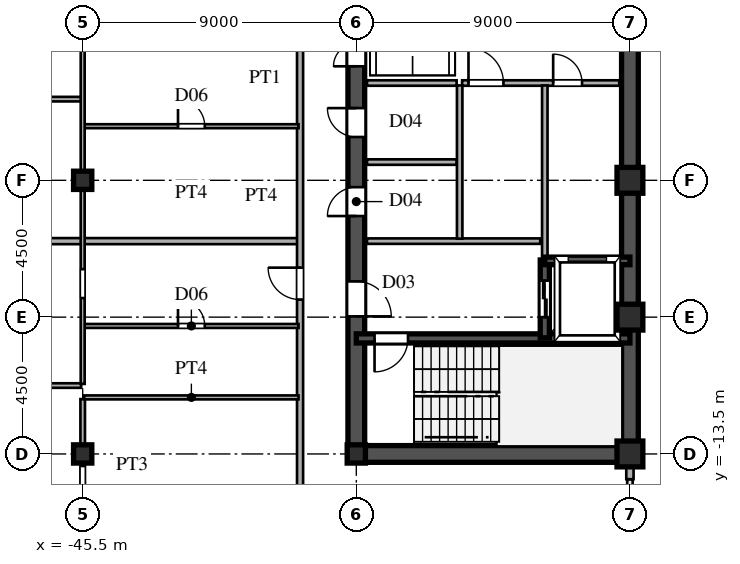
"""IFC4 building model, lengths in metres.
Left out: names, types, materials, properties, quantities, classifications, styles, units other than length and angle.
Written with IfcOpenShell. Run it as: python <this file> out.ifc"""

import sys

from ifc_helpers import new_model, si_unit, direction, frame, frame_2d, origin, origin_2d, place, context, subcontext, project, spatial, rectangle, hollow_rectangle, i_section, extrude, source, transform, mapped, element, fill, save


model = new_model("IFC4")
c1 = context("Model", 3, precision=1e-05, world=origin(), true_north=direction((0.0, 1.0)))
c2 = subcontext(c1, "Body", "Model", "MODEL_VIEW")
j1 = project(units=[si_unit("LENGTHUNIT", "METRE"), si_unit("PLANEANGLEUNIT", "RADIAN")], contexts=[c1])
p1 = place(None, origin())
s1 = spatial("IfcSite", under=j1, at=p1, CompositionType="ELEMENT")
p2 = place(p1, origin())
s2 = spatial("IfcBuilding", under=s1, at=p2, CompositionType="ELEMENT")
p3 = place(p2, frame((0.0, 0.0, 181.5)))
s3 = spatial("IfcBuildingStorey", under=s2, at=p3, CompositionType="ELEMENT", Elevation=181.5)
m1 = source(origin(), c2, "Body", "SweptSolid", [
    extrude(hollow_rectangle(XDim=0.85, YDim=0.85, WallThickness=0.036, at=origin_2d()), origin(), (0.0, 0.0, 1.0), 3.6),
])
for number, where, z_axis, x_axis in (
    (1, (-27.5, -13.5, 0.0), (0.0, 0.0, 1.0), (1.0, 0.0, 0.0)),
    (2, (-27.5, -9.0, 0.0), (0.0, 0.0, 1.0), (1.0, 0.0, 0.0)),
    (3, (-27.5, -4.5, 0.0), (0.0, 0.0, 1.0), (1.0, 0.0, 0.0)),
):
    element("IfcColumn", number, at=place(p3, frame(where, z_axis=z_axis, x_axis=x_axis)), inside=s3, PredefinedType="COLUMN", context=c2, shape_type="MappedRepresentation", body=[
        mapped(m1, transform((0.0, 0.0, 0.0), scale=1.0)),
    ])
m2 = source(origin(), c2, "Body", "SweptSolid", [
    extrude(i_section(OverallWidth=0.6, OverallDepth=0.6, WebThickness=0.025, FlangeThickness=0.04, at=origin_2d()), origin(), (0.0, 0.0, 1.0), 3.6),
])
for number, where, z_axis, x_axis in (
    (4, (-36.5, -13.5, 0.0), (0.0, 0.0, 1.0), (1.0, 0.0, 0.0)),
    (5, (-45.5, -13.5, 0.0), (0.0, 0.0, 1.0), (1.0, 0.0, 0.0)),
    (6, (-45.5, -4.5, 0.0), (0.0, 0.0, 1.0), (1.0, 0.0, 0.0)),
):
    element("IfcColumn", number, at=place(p3, frame(where, z_axis=z_axis, x_axis=x_axis)), inside=s3, PredefinedType="COLUMN", context=c2, shape_type="MappedRepresentation", body=[
        mapped(m2, transform((0.0, 0.0, 0.0), scale=1.0)),
    ])
p4 = place(p3, frame((-27.5, -14.33, 0.0), z_axis=(0.0, 0.0, 1.0), x_axis=(0.0, 1.0, 0.0)))
e7 = element("IfcWall", 7, at=p4, inside=s3, PredefinedType="SOLIDWALL", context=c2, shape_type="SweptSolid", body=[
    extrude(rectangle(XDim=0.55, YDim=0.24, at=frame_2d((0.275, 0.0))), origin(), (0.0, 0.0, 1.0), 2.88),
])
p5 = place(p3, frame((-27.5, -13.5, 0.0), z_axis=(0.0, 0.0, 1.0), x_axis=(0.0, 1.0, 0.0)))
e8 = element("IfcWall", 8, at=p5, inside=s3, PredefinedType="SHEAR", context=c2, shape_type="SweptSolid", body=[
    extrude(rectangle(XDim=12.2, YDim=0.55, at=frame_2d((6.1, 0.0))), origin(), (0.0, 0.0, 1.0), 3.38),
])
p6 = place(p3, frame((-27.5, -1.3, 0.0), z_axis=(0.0, 0.0, 1.0), x_axis=(0.0, 1.0, 0.0)))
e9 = element("IfcWall", 9, at=p6, inside=s3, PredefinedType="SHEAR", context=c2, shape_type="SweptSolid", body=[
    extrude(rectangle(XDim=2.6, YDim=0.55, at=frame_2d((1.3, 0.0))), origin(), (0.0, 0.0, 1.0), 3.38),
])
p7 = place(p3, frame((-36.5, -13.5, 0.0), z_axis=(0.0, 0.0, 1.0), x_axis=(1.0, 0.0, 0.0)))
e10 = element("IfcWall", 10, at=p7, inside=s3, PredefinedType="SHEAR", context=c2, shape_type="SweptSolid", body=[
    extrude(rectangle(XDim=9.0, YDim=0.55, at=frame_2d((4.5, 0.0))), origin(), (0.0, 0.0, 1.0), 3.38),
])
p8 = place(p3, frame((-36.5, -13.65, 0.0), z_axis=(0.0, 0.0, 1.0), x_axis=(0.0, 1.0, 0.0)))
e11 = element("IfcWall", 11, at=p8, inside=s3, PredefinedType="SHEAR", context=c2, shape_type="SweptSolid", body=[
    extrude(rectangle(XDim=7.15, YDim=0.55, at=frame_2d((3.575, 0.0))), origin(), (0.0, 0.0, 1.0), 3.38),
])
p9 = place(p8, frame((4.675, 0.0, 0.0)))
e12 = element("IfcOpeningElement", 12, at=p9, cuts=e11, PredefinedType="OPENING", context=c2, shape_type="SweptSolid", body=[
    extrude(rectangle(XDim=1.15, YDim=2.2, at=frame_2d((0.575, 1.1))), frame((0.0, 0.285, 0.0), z_axis=(0.0, -1.0, 0.0), x_axis=(1.0, 0.0, 0.0)), (0.0, 0.0, 1.0), 0.57),
])
p10 = place(p3, frame((-36.5, -1.3, 0.0), z_axis=(0.0, 0.0, 1.0), x_axis=(0.0, 1.0, 0.0)))
e13 = element("IfcWall", 13, at=p10, inside=s3, PredefinedType="SHEAR", context=c2, shape_type="SweptSolid", body=[
    extrude(rectangle(XDim=2.6, YDim=0.55, at=frame_2d((1.3, 0.0))), origin(), (0.0, 0.0, 1.0), 3.38),
])
p11 = place(p10, frame((0.55, 0.0, 0.0)))
e14 = element("IfcOpeningElement", 14, at=p11, cuts=e13, PredefinedType="OPENING", context=c2, shape_type="SweptSolid", body=[
    extrude(rectangle(XDim=1.5, YDim=2.3, at=frame_2d((0.75, 1.15))), frame((0.0, 0.285, 0.0), z_axis=(0.0, -1.0, 0.0), x_axis=(1.0, 0.0, 0.0)), (0.0, 0.0, 1.0), 0.57),
])
p12 = place(p3, frame((-36.5, -6.5, 0.0), z_axis=(0.0, 0.0, 1.0), x_axis=(0.0, 1.0, 0.0)))
e15 = element("IfcWall", 15, at=p12, inside=s3, PredefinedType="SHEAR", context=c2, shape_type="SweptSolid", body=[
    extrude(rectangle(XDim=2.6, YDim=0.55, at=frame_2d((1.3, 0.0))), origin(), (0.0, 0.0, 1.0), 3.38),
])
p13 = place(p12, frame((0.825, 0.0, 0.0)))
e16 = element("IfcOpeningElement", 16, at=p13, cuts=e15, PredefinedType="OPENING", context=c2, shape_type="SweptSolid", body=[
    extrude(rectangle(XDim=0.95, YDim=2.15, at=frame_2d((0.475, 1.075))), frame((0.0, 0.285, 0.0), z_axis=(0.0, -1.0, 0.0), x_axis=(1.0, 0.0, 0.0)), (0.0, 0.0, 1.0), 0.57),
])
p14 = place(p3, frame((-36.5, -3.9, 0.0), z_axis=(0.0, 0.0, 1.0), x_axis=(0.0, 1.0, 0.0)))
e17 = element("IfcWall", 17, at=p14, inside=s3, PredefinedType="SHEAR", context=c2, shape_type="SweptSolid", body=[
    extrude(rectangle(XDim=2.6, YDim=0.55, at=frame_2d((1.3, 0.0))), origin(), (0.0, 0.0, 1.0), 3.38),
])
p15 = place(p14, frame((0.825, 0.0, 0.0)))
e18 = element("IfcOpeningElement", 18, at=p15, cuts=e17, PredefinedType="OPENING", context=c2, shape_type="SweptSolid", body=[
    extrude(rectangle(XDim=0.95, YDim=2.15, at=frame_2d((0.475, 1.075))), frame((0.0, 0.285, 0.0), z_axis=(0.0, -1.0, 0.0), x_axis=(1.0, 0.0, 0.0)), (0.0, 0.0, 1.0), 0.57),
])
p16 = place(p3, frame((-36.5, -9.7, 0.0), z_axis=(0.0, 0.0, 1.0), x_axis=(1.0, 0.0, 0.0)))
e19 = element("IfcWall", 19, at=p16, inside=s3, PredefinedType="SHEAR", context=c2, shape_type="SweptSolid", body=[
    extrude(rectangle(XDim=9.0, YDim=0.3, at=frame_2d((4.5, 0.0))), origin(), (0.0, 0.0, 1.0), 3.38),
])
p17 = place(p16, frame((0.6, 0.0, 0.0)))
e20 = element("IfcOpeningElement", 20, at=p17, cuts=e19, PredefinedType="OPENING", context=c2, shape_type="SweptSolid", body=[
    extrude(rectangle(XDim=1.1, YDim=2.2, at=frame_2d((0.55, 1.1))), frame((0.0, 0.16, 0.0), z_axis=(0.0, -1.0, 0.0), x_axis=(1.0, 0.0, 0.0)), (0.0, 0.0, 1.0), 0.32),
])
p18 = place(p3, frame((-30.3, -7.15, 0.0), z_axis=(0.0, 0.0, 1.0), x_axis=(1.0, 0.0, 0.0)))
e21 = element("IfcWall", 21, at=p18, inside=s3, PredefinedType="SHEAR", context=c2, shape_type="SweptSolid", body=[
    extrude(rectangle(XDim=2.8, YDim=0.25, at=frame_2d((1.4, 0.0))), origin(), (0.0, 0.0, 1.0), 3.38),
])
p19 = place(p3, frame((-30.3, -9.68, 0.0), z_axis=(0.0, 0.0, 1.0), x_axis=(0.0, 1.0, 0.0)))
e22 = element("IfcWall", 22, at=p19, inside=s3, PredefinedType="SHEAR", context=c2, shape_type="SweptSolid", body=[
    extrude(rectangle(XDim=2.56, YDim=0.3, at=frame_2d((1.28, 0.0))), origin(), (0.0, 0.0, 1.0), 3.38),
])
p20 = place(p19, frame((0.68, 0.0, 0.0)))
e23 = element("IfcOpeningElement", 23, at=p20, cuts=e22, PredefinedType="OPENING", context=c2, shape_type="SweptSolid", body=[
    extrude(rectangle(XDim=1.2, YDim=2.25, at=frame_2d((0.6, 1.125))), frame((0.0, 0.16, 0.0), z_axis=(0.0, -1.0, 0.0), x_axis=(1.0, 0.0, 0.0)), (0.0, 0.0, 1.0), 0.32),
])
p21 = place(p3, frame((-36.15, -6.5, 0.0), z_axis=(0.0, 0.0, 1.0), x_axis=(1.0, 0.0, 0.0)))
e24 = element("IfcWall", 24, at=p21, inside=s3, PredefinedType="PARTITIONING", context=c2, shape_type="SweptSolid", body=[
    extrude(rectangle(XDim=5.7, YDim=0.18, at=frame_2d((2.85, 0.0))), origin(), (0.0, 0.0, 1.0), 3.38),
])
p22 = place(p3, frame((-33.1, -6.42, 0.0), z_axis=(0.0, 0.0, 1.0), x_axis=(0.0, 1.0, 0.0)))
e25 = element("IfcWall", 25, at=p22, inside=s3, PredefinedType="PARTITIONING", context=c2, shape_type="SweptSolid", body=[
    extrude(rectangle(XDim=5.04, YDim=0.18, at=frame_2d((2.52, 0.0))), origin(), (0.0, 0.0, 1.0), 3.38),
])
p23 = place(p3, frame((-30.3, -1.3, 0.0), z_axis=(0.0, 0.0, 1.0), x_axis=(1.0, 0.0, 0.0)))
e26 = element("IfcWall", 26, at=p23, inside=s3, PredefinedType="PARTITIONING", context=c2, shape_type="SweptSolid", body=[
    extrude(rectangle(XDim=2.45, YDim=0.18, at=frame_2d((1.225, 0.0))), origin(), (0.0, 0.0, 1.0), 3.38),
])
p24 = place(p23, frame((0.275, 0.0, 0.0)))
e27 = element("IfcOpeningElement", 27, at=p24, cuts=e26, PredefinedType="OPENING", context=c2, shape_type="SweptSolid", body=[
    extrude(rectangle(XDim=0.95, YDim=2.15, at=frame_2d((0.475, 1.075))), frame((0.0, 0.1, 0.0), z_axis=(0.0, -1.0, 0.0), x_axis=(1.0, 0.0, 0.0)), (0.0, 0.0, 1.0), 0.2),
])
p25 = place(p3, frame((-33.02, -1.3, 0.0), z_axis=(0.0, 0.0, 1.0), x_axis=(1.0, 0.0, 0.0)))
e28 = element("IfcWall", 28, at=p25, inside=s3, PredefinedType="PARTITIONING", context=c2, shape_type="SweptSolid", body=[
    extrude(rectangle(XDim=2.72, YDim=0.18, at=frame_2d((1.36, 0.0))), origin(), (0.0, 0.0, 1.0), 3.38),
])
p26 = place(p25, frame((0.21, 0.0, 0.0)))
e29 = element("IfcOpeningElement", 29, at=p26, cuts=e28, PredefinedType="OPENING", context=c2, shape_type="SweptSolid", body=[
    extrude(rectangle(XDim=1.15, YDim=2.2, at=frame_2d((0.575, 1.1))), frame((0.0, 0.1, 0.0), z_axis=(0.0, -1.0, 0.0), x_axis=(1.0, 0.0, 0.0)), (0.0, 0.0, 1.0), 0.2),
])
p27 = place(p3, frame((-30.3, -7.12, 0.0), z_axis=(0.0, 0.0, 1.0), x_axis=(0.0, 1.0, 0.0)))
e30 = element("IfcWall", 30, at=p27, inside=s3, PredefinedType="PARTITIONING", context=c2, shape_type="SweptSolid", body=[
    extrude(rectangle(XDim=5.74, YDim=0.18, at=frame_2d((2.87, 0.0))), origin(), (0.0, 0.0, 1.0), 3.38),
])
for number, where, z_axis, x_axis in (
    (31, (-36.15, -1.3, 0.0), (0.0, 0.0, 1.0), (1.0, 0.0, 0.0)),
    (32, (-36.15, -3.9, 0.0), (0.0, 0.0, 1.0), (1.0, 0.0, 0.0)),
):
    element("IfcWall", number, at=place(p3, frame(where, z_axis=z_axis, x_axis=x_axis)), inside=s3, PredefinedType="PARTITIONING", context=c2, shape_type="SweptSolid", body=[
        extrude(rectangle(XDim=2.95, YDim=0.18, at=frame_2d((1.475, 0.0))), origin(), (0.0, 0.0, 1.0), 3.38),
    ])
p28 = place(p3, frame((-45.45, -11.64, 0.0), z_axis=(0.0, 0.0, 1.0), x_axis=(1.0, 0.0, 0.0)))
e33 = element("IfcWall", 33, at=p28, inside=s3, PredefinedType="PARTITIONING", context=c2, shape_type="SweptSolid", body=[
    extrude(rectangle(XDim=7.05, YDim=0.13, at=frame_2d((3.525, 0.0))), origin(), (0.0, 0.0, 1.0), 3.38),
])
p29 = place(p3, frame((-53.983, -11.25, 0.0), z_axis=(0.0, 0.0, 1.0), x_axis=(1.0, 0.0, 0.0)))
e34 = element("IfcWall", 34, at=p29, inside=s3, PredefinedType="PARTITIONING", context=c2, shape_type="SweptSolid", body=[
    extrude(rectangle(XDim=8.433, YDim=0.15, at=frame_2d((4.216, 0.0))), origin(), (0.0, 0.0, 1.0), 3.38),
])
p30 = place(p29, frame((3.741, 0.0, 0.0)))
e35 = element("IfcOpeningElement", 35, at=p30, cuts=e34, PredefinedType="OPENING", context=c2, shape_type="SweptSolid", body=[
    extrude(rectangle(XDim=0.95, YDim=2.15, at=frame_2d((0.475, 1.075))), frame((0.0, 0.085, 0.0), z_axis=(0.0, -1.0, 0.0), x_axis=(1.0, 0.0, 0.0)), (0.0, 0.0, 1.0), 0.17),
])
p31 = place(p3, frame((-45.45, -9.29, 0.0), z_axis=(0.0, 0.0, 1.0), x_axis=(1.0, 0.0, 0.0)))
e36 = element("IfcWall", 36, at=p31, inside=s3, PredefinedType="PARTITIONING", context=c2, shape_type="SweptSolid", body=[
    extrude(rectangle(XDim=7.05, YDim=0.13, at=frame_2d((3.525, 0.0))), origin(), (0.0, 0.0, 1.0), 3.38),
])
p32 = place(p31, frame((3.085, 0.0, 0.0)))
e37 = element("IfcOpeningElement", 37, at=p32, cuts=e36, PredefinedType="OPENING", context=c2, shape_type="SweptSolid", body=[
    extrude(rectangle(XDim=0.88, YDim=2.1, at=frame_2d((0.44, 1.05))), frame((0.0, 0.075, 0.0), z_axis=(0.0, -1.0, 0.0), x_axis=(1.0, 0.0, 0.0)), (0.0, 0.0, 1.0), 0.15),
])
p33 = place(p3, frame((-62.577, -6.5, 0.0), z_axis=(0.0, 0.0, 1.0), x_axis=(1.0, 0.0, 0.0)))
e38 = element("IfcWall", 38, at=p33, inside=s3, PredefinedType="PARTITIONING", context=c2, shape_type="SweptSolid", body=[
    extrude(rectangle(XDim=24.147, YDim=0.2, at=frame_2d((12.073, 0.0))), origin(), (0.0, 0.0, 1.0), 3.38),
])
p34 = place(p3, frame((-45.45, -2.72, 0.0), z_axis=(0.0, 0.0, 1.0), x_axis=(1.0, 0.0, 0.0)))
e39 = element("IfcWall", 39, at=p34, inside=s3, PredefinedType="PARTITIONING", context=c2, shape_type="SweptSolid", body=[
    extrude(rectangle(XDim=7.05, YDim=0.13, at=frame_2d((3.525, 0.0))), origin(), (0.0, 0.0, 1.0), 3.38),
])
p35 = place(p34, frame((3.085, 0.0, 0.0)))
e40 = element("IfcOpeningElement", 40, at=p35, cuts=e39, PredefinedType="OPENING", context=c2, shape_type="SweptSolid", body=[
    extrude(rectangle(XDim=0.88, YDim=2.1, at=frame_2d((0.44, 1.05))), frame((0.0, 0.075, 0.0), z_axis=(0.0, -1.0, 0.0), x_axis=(1.0, 0.0, 0.0)), (0.0, 0.0, 1.0), 0.15),
])
p36 = place(p3, frame((-68.535, -1.83, 0.0), z_axis=(0.0, 0.0, 1.0), x_axis=(1.0, 0.0, 0.0)))
e41 = element("IfcWall", 41, at=p36, inside=s3, PredefinedType="PARTITIONING", context=c2, shape_type="SweptSolid", body=[
    extrude(rectangle(XDim=22.985, YDim=0.15, at=frame_2d((11.492, 0.0))), origin(), (0.0, 0.0, 1.0), 3.38),
])
p37 = place(p36, frame((18.06, 0.0, 0.0)))
e42 = element("IfcOpeningElement", 42, at=p37, cuts=e41, PredefinedType="OPENING", context=c2, shape_type="SweptSolid", body=[
    extrude(rectangle(XDim=0.95, YDim=2.15, at=frame_2d((0.475, 1.075))), frame((0.0, 0.085, 0.0), z_axis=(0.0, -1.0, 0.0), x_axis=(1.0, 0.0, 0.0)), (0.0, 0.0, 1.0), 0.17),
])
p38 = place(p36, frame((10.71, 0.0, 0.0)))
e43 = element("IfcOpeningElement", 43, at=p38, cuts=e41, PredefinedType="OPENING", context=c2, shape_type="SweptSolid", body=[
    extrude(rectangle(XDim=0.95, YDim=2.15, at=frame_2d((0.475, 1.075))), frame((0.0, 0.085, 0.0), z_axis=(0.0, -1.0, 0.0), x_axis=(1.0, 0.0, 0.0)), (0.0, 0.0, 1.0), 0.17),
])
p39 = place(p3, frame((-45.5, -16.027, 0.0), z_axis=(0.0, 0.0, 1.0), x_axis=(0.0, 1.0, 0.0)))
e44 = element("IfcWall", 44, at=p39, inside=s3, PredefinedType="PARTITIONING", context=c2, shape_type="SweptSolid", body=[
    extrude(rectangle(XDim=4.332, YDim=0.15, at=frame_2d((2.166, 0.0))), origin(), (0.0, 0.0, 1.0), 2.78),
])
p40 = place(p39, frame((1.181, 0.0, 0.0)))
e45 = element("IfcOpeningElement", 45, at=p40, cuts=e44, PredefinedType="OPENING", context=c2, shape_type="SweptSolid", body=[
    extrude(rectangle(XDim=0.95, YDim=2.15, at=frame_2d((0.475, 1.075))), frame((0.0, 0.085, 0.0), z_axis=(0.0, -1.0, 0.0), x_axis=(1.0, 0.0, 0.0)), (0.0, 0.0, 1.0), 0.17),
])
p41 = place(p3, frame((-45.5, -11.196, 0.0), z_axis=(0.0, 0.0, 1.0), x_axis=(0.0, 1.0, 0.0)))
e46 = element("IfcWall", 46, at=p41, inside=s3, PredefinedType="PARTITIONING", context=c2, shape_type="SweptSolid", body=[
    extrude(rectangle(XDim=13.979, YDim=0.13, at=frame_2d((6.99, 0.0))), origin(), (0.0, 0.0, 1.0), 2.78),
])
p42 = place(p41, frame((2.823, 0.0, 0.0)))
e47 = element("IfcOpeningElement", 47, at=p42, cuts=e46, PredefinedType="OPENING", context=c2, shape_type="SweptSolid", body=[
    extrude(rectangle(XDim=0.95, YDim=2.15, at=frame_2d((0.475, 1.075))), frame((0.0, 0.075, 0.0), z_axis=(0.0, -1.0, 0.0), x_axis=(1.0, 0.0, 0.0)), (0.0, 0.0, 1.0), 0.15),
])
p43 = place(p41, frame((11.221, 0.0, 0.0)))
e48 = element("IfcOpeningElement", 48, at=p43, cuts=e46, PredefinedType="OPENING", context=c2, shape_type="SweptSolid", body=[
    extrude(rectangle(XDim=0.95, YDim=2.15, at=frame_2d((0.475, 1.075))), frame((0.0, 0.075, 0.0), z_axis=(0.0, -1.0, 0.0), x_axis=(1.0, 0.0, 0.0)), (0.0, 0.0, 1.0), 0.15),
])
p44 = place(p3, frame((-38.35, -15.715, 0.0), z_axis=(0.0, 0.0, 1.0), x_axis=(0.0, 1.0, 0.0)))
e49 = element("IfcWall", 49, at=p44, inside=s3, PredefinedType="PARTITIONING", context=c2, shape_type="SweptSolid", body=[
    extrude(rectangle(XDim=31.43, YDim=0.2, at=frame_2d((15.715, 0.0))), origin(), (0.0, 0.0, 1.0), 3.38),
])
p45 = place(p44, frame((7.292, 0.0, 0.0)))
e50 = element("IfcOpeningElement", 50, at=p45, cuts=e49, PredefinedType="OPENING", context=c2, shape_type="SweptSolid", body=[
    extrude(rectangle(XDim=1.05, YDim=2.25, at=frame_2d((0.525, 1.125))), frame((0.0, 0.11, 0.0), z_axis=(0.0, -1.0, 0.0), x_axis=(1.0, 0.0, 0.0)), (0.0, 0.0, 1.0), 0.22),
])
p46 = place(p44, frame((15.48, 0.0, 0.0)))
e51 = element("IfcOpeningElement", 51, at=p46, cuts=e49, PredefinedType="OPENING", context=c2, shape_type="SweptSolid", body=[
    extrude(rectangle(XDim=1.05, YDim=2.25, at=frame_2d((0.525, 1.125))), frame((0.0, 0.11, 0.0), z_axis=(0.0, -1.0, 0.0), x_axis=(1.0, 0.0, 0.0)), (0.0, 0.0, 1.0), 0.22),
])
p47 = place(p44, frame((26.84, 0.0, 0.0)))
e52 = element("IfcOpeningElement", 52, at=p47, cuts=e49, PredefinedType="OPENING", context=c2, shape_type="SweptSolid", body=[
    extrude(rectangle(XDim=1.05, YDim=2.25, at=frame_2d((0.525, 1.125))), frame((0.0, 0.11, 0.0), z_axis=(0.0, -1.0, 0.0), x_axis=(1.0, 0.0, 0.0)), (0.0, 0.0, 1.0), 0.22),
])
m3 = source(origin(), c2, "Body", "SweptSolid", [
    extrude(rectangle(XDim=1.15, YDim=2.2, at=frame_2d((0.575, 1.1))), frame((0.0, 0.025, 0.0), z_axis=(0.0, -1.0, 0.0), x_axis=(1.0, 0.0, 0.0)), (0.0, 0.0, 1.0), 0.05),
])
p48 = place(p9, frame((1.15, 0.0, 0.0), z_axis=(0.0, 0.0, 1.0), x_axis=(-1.0, 0.0, 0.0)))
e53 = element("IfcDoor", 53, at=p48, inside=s3, OperationType="SINGLE_SWING_LEFT", PredefinedType="DOOR", context=c2, shape_type="MappedRepresentation", body=[
    mapped(m3, transform((0.0, 0.0, 0.0), scale=1.0)),
])
fill(e12, e53)
m4 = source(origin(), c2, "Body", "SweptSolid", [
    extrude(rectangle(XDim=1.5, YDim=2.3, at=frame_2d((0.75, 1.15))), frame((0.0, 0.025, 0.0), z_axis=(0.0, -1.0, 0.0), x_axis=(1.0, 0.0, 0.0)), (0.0, 0.0, 1.0), 0.05),
])
p49 = place(p11, origin())
e54 = element("IfcDoor", 54, at=p49, inside=s3, OperationType="DOUBLE_SWING_LEFT", PredefinedType="DOOR", context=c2, shape_type="MappedRepresentation", body=[
    mapped(m4, transform((0.0, 0.0, 0.0), scale=1.0)),
])
fill(e14, e54)
m5 = source(origin(), c2, "Body", "SweptSolid", [
    extrude(rectangle(XDim=0.95, YDim=2.15, at=frame_2d((0.475, 1.075))), frame((0.0, 0.025, 0.0), z_axis=(0.0, -1.0, 0.0), x_axis=(1.0, 0.0, 0.0)), (0.0, 0.0, 1.0), 0.05),
])
p50 = place(p13, origin())
e55 = element("IfcDoor", 55, at=p50, inside=s3, OperationType="SINGLE_SWING_LEFT", PredefinedType="DOOR", context=c2, shape_type="MappedRepresentation", body=[
    mapped(m5, transform((0.0, 0.0, 0.0), scale=1.0)),
])
fill(e16, e55)
p51 = place(p15, origin())
e56 = element("IfcDoor", 56, at=p51, inside=s3, OperationType="SINGLE_SWING_RIGHT", PredefinedType="DOOR", context=c2, shape_type="MappedRepresentation", body=[
    mapped(m5, transform((0.0, 0.0, 0.0), scale=1.0)),
])
fill(e18, e56)
m6 = source(origin(), c2, "Body", "SweptSolid", [
    extrude(rectangle(XDim=1.1, YDim=2.2, at=frame_2d((0.55, 1.1))), frame((0.0, 0.025, 0.0), z_axis=(0.0, -1.0, 0.0), x_axis=(1.0, 0.0, 0.0)), (0.0, 0.0, 1.0), 0.05),
])
p52 = place(p17, frame((1.1, 0.0, 0.0), z_axis=(0.0, 0.0, 1.0), x_axis=(-1.0, 0.0, 0.0)))
e57 = element("IfcDoor", 57, at=p52, inside=s3, OperationType="SINGLE_SWING_LEFT", PredefinedType="DOOR", context=c2, shape_type="MappedRepresentation", body=[
    mapped(m6, transform((0.0, 0.0, 0.0), scale=1.0)),
])
fill(e20, e57)
m7 = source(origin(), c2, "Body", "SweptSolid", [
    extrude(rectangle(XDim=1.2, YDim=2.25, at=frame_2d((0.6, 1.125))), frame((0.0, 0.025, 0.0), z_axis=(0.0, -1.0, 0.0), x_axis=(1.0, 0.0, 0.0)), (0.0, 0.0, 1.0), 0.05),
])
p53 = place(p20, origin())
e58 = element("IfcDoor", 58, at=p53, inside=s3, OperationType="DOUBLE_DOOR_SLIDING", PredefinedType="DOOR", context=c2, shape_type="MappedRepresentation", body=[
    mapped(m7, transform((0.0, 0.0, 0.0), scale=1.0)),
])
fill(e23, e58)
p54 = place(p24, origin())
e59 = element("IfcDoor", 59, at=p54, inside=s3, OperationType="SINGLE_SWING_LEFT", PredefinedType="DOOR", context=c2, shape_type="MappedRepresentation", body=[
    mapped(m5, transform((0.0, 0.0, 0.0), scale=1.0)),
])
fill(e27, e59)
p55 = place(p26, origin())
e60 = element("IfcDoor", 60, at=p55, inside=s3, OperationType="SINGLE_SWING_LEFT", PredefinedType="DOOR", context=c2, shape_type="MappedRepresentation", body=[
    mapped(m3, transform((0.0, 0.0, 0.0), scale=1.0)),
])
fill(e29, e60)
m8 = source(origin(), c2, "Body", "SweptSolid", [
    extrude(rectangle(XDim=0.88, YDim=2.1, at=frame_2d((0.44, 1.05))), frame((0.0, 0.025, 0.0), z_axis=(0.0, -1.0, 0.0), x_axis=(1.0, 0.0, 0.0)), (0.0, 0.0, 1.0), 0.05),
])
p56 = place(p32, origin())
e61 = element("IfcDoor", 61, at=p56, inside=s3, OperationType="SINGLE_SWING_LEFT", PredefinedType="DOOR", context=c2, shape_type="MappedRepresentation", body=[
    mapped(m8, transform((0.0, 0.0, 0.0), scale=1.0)),
])
fill(e37, e61)
p57 = place(p35, origin())
e62 = element("IfcDoor", 62, at=p57, inside=s3, OperationType="SINGLE_SWING_LEFT", PredefinedType="DOOR", context=c2, shape_type="MappedRepresentation", body=[
    mapped(m8, transform((0.0, 0.0, 0.0), scale=1.0)),
])
fill(e40, e62)
m9 = source(origin(), c2, "Body", "SweptSolid", [
    extrude(rectangle(XDim=1.05, YDim=2.25, at=frame_2d((0.525, 1.125))), frame((0.0, 0.025, 0.0), z_axis=(0.0, -1.0, 0.0), x_axis=(1.0, 0.0, 0.0)), (0.0, 0.0, 1.0), 0.05),
])
p58 = place(p45, origin())
e63 = element("IfcDoor", 63, at=p58, inside=s3, OperationType="SINGLE_SWING_RIGHT", PredefinedType="DOOR", context=c2, shape_type="MappedRepresentation", body=[
    mapped(m9, transform((0.0, 0.0, 0.0), scale=1.0)),
])
fill(e50, e63)
save(model, sys.argv[1])
